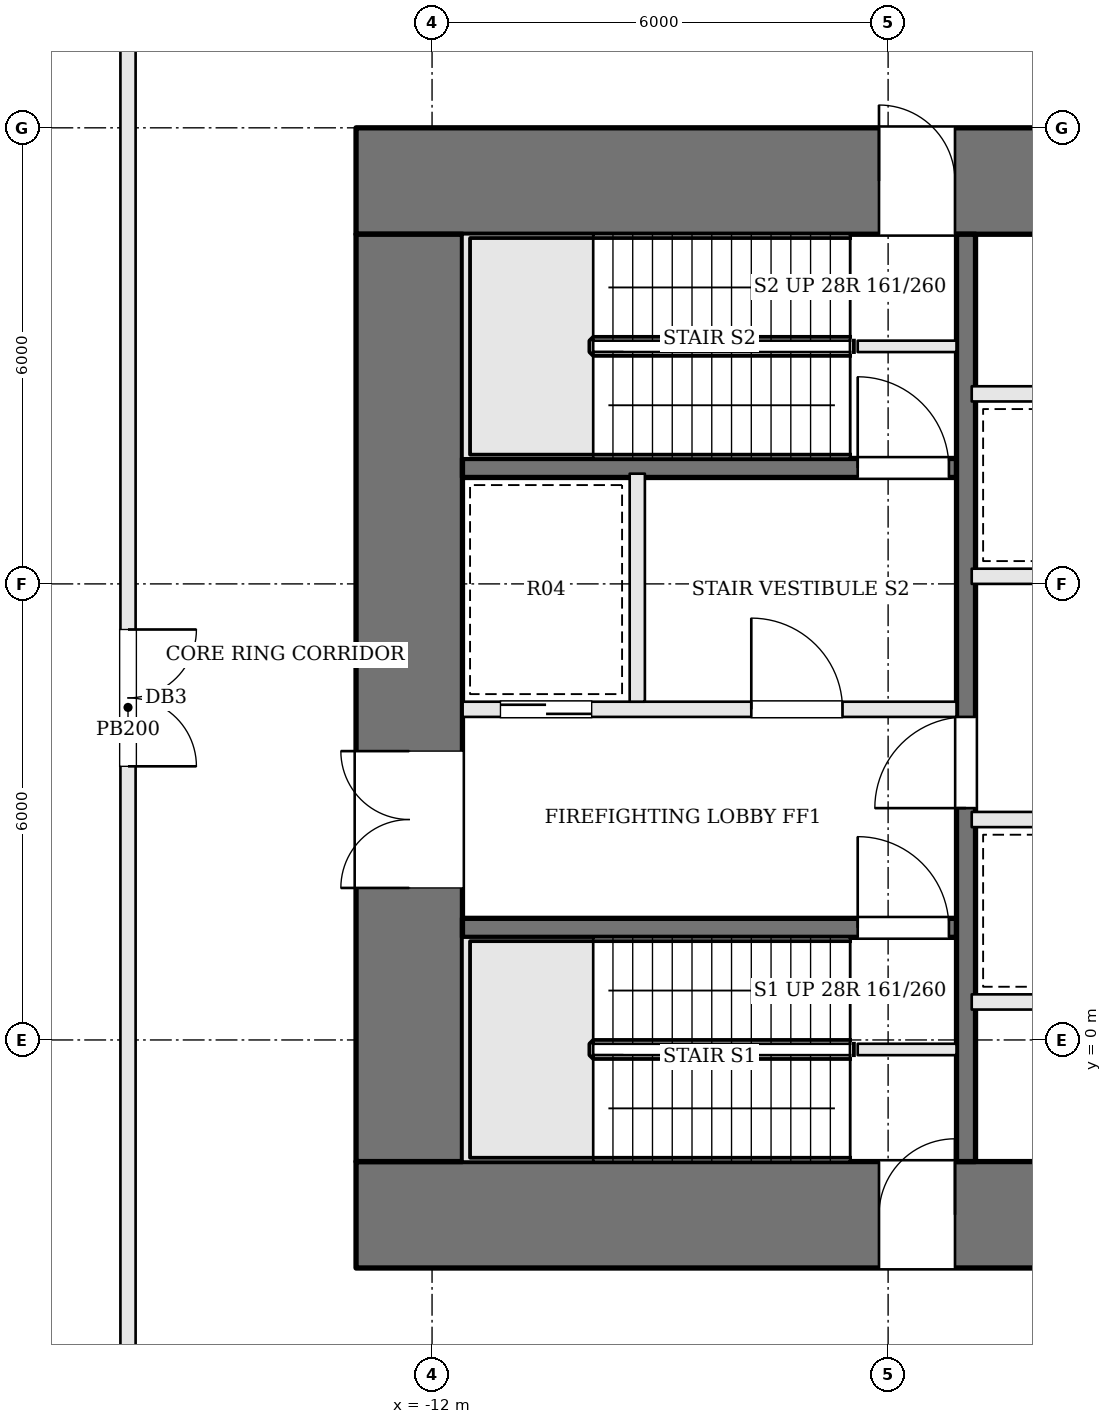
"""IFC4 building model, lengths in metres.
Left out: names, types, materials, properties, quantities, classifications, styles, units other than length and angle.
Written with IfcOpenShell. Run it as: python <this file> out.ifc"""

import sys

from ifc_helpers import new_model, si_unit, direction, frame, frame_2d, origin, place, context, subcontext, project, spatial, rectangle, extrude, element, fill, save


model = new_model("IFC4")
c1 = context("Model", 3, precision=1e-05, world=origin(), true_north=direction((0.0, 1.0)))
c2 = subcontext(c1, "Body", "Model", "MODEL_VIEW")
j1 = project(units=[si_unit("LENGTHUNIT", "METRE"), si_unit("PLANEANGLEUNIT", "RADIAN")], contexts=[c1])
p1 = place(None, origin())
s1 = spatial("IfcSite", under=j1, at=p1, CompositionType="ELEMENT")
p2 = place(p1, origin())
s2 = spatial("IfcBuilding", under=s1, at=p2, CompositionType="ELEMENT")
p3 = place(p2, frame((0.0, 0.0, 33.0)))
s3 = spatial("IfcBuildingStorey", under=s2, at=p3, CompositionType="ELEMENT", Elevation=33.0)
p4 = place(p3, frame((-13.0, 11.3, 0.0), z_axis=(0.0, 0.0, 1.0), x_axis=(1.0, 0.0, 0.0)))
e1 = element("IfcWall", 1, at=p4, inside=s3, PredefinedType="SHEAR", context=c2, shape_type="SweptSolid", body=[
    extrude(rectangle(XDim=26.0, YDim=1.4, at=frame_2d((13.0, 0.0))), origin(), (0.0, 0.0, 1.0), 4.5),
])
p5 = place(p4, frame((8.975, 0.0, 0.0)))
e2 = element("IfcOpeningElement", 2, at=p5, cuts=e1, PredefinedType="OPENING", context=c2, shape_type="SweptSolid", body=[
    extrude(rectangle(XDim=0.7, YDim=2.1, at=frame_2d((0.35, 1.05))), frame((0.0, 0.71, 0.0), z_axis=(0.0, -1.0, 0.0), x_axis=(1.0, 0.0, 0.0)), (0.0, 0.0, 1.0), 1.42),
])
p6 = place(p4, frame((11.575, 0.0, 0.0)))
e3 = element("IfcOpeningElement", 3, at=p6, cuts=e1, PredefinedType="OPENING", context=c2, shape_type="SweptSolid", body=[
    extrude(rectangle(XDim=1.2, YDim=2.1, at=frame_2d((0.6, 1.05))), frame((0.0, 0.71, 0.0), z_axis=(0.0, -1.0, 0.0), x_axis=(1.0, 0.0, 0.0)), (0.0, 0.0, 1.0), 1.42),
])
p7 = place(p4, frame((14.675, 0.0, 0.0)))
e4 = element("IfcOpeningElement", 4, at=p7, cuts=e1, PredefinedType="OPENING", context=c2, shape_type="SweptSolid", body=[
    extrude(rectangle(XDim=0.7, YDim=2.1, at=frame_2d((0.35, 1.05))), frame((0.0, 0.71, 0.0), z_axis=(0.0, -1.0, 0.0), x_axis=(1.0, 0.0, 0.0)), (0.0, 0.0, 1.0), 1.42),
])
p8 = place(p4, frame((16.725, 0.0, 0.0)))
e5 = element("IfcOpeningElement", 5, at=p8, cuts=e1, PredefinedType="OPENING", context=c2, shape_type="SweptSolid", body=[
    extrude(rectangle(XDim=0.7, YDim=2.1, at=frame_2d((0.35, 1.05))), frame((0.0, 0.71, 0.0), z_axis=(0.0, -1.0, 0.0), x_axis=(1.0, 0.0, 0.0)), (0.0, 0.0, 1.0), 1.42),
])
p9 = place(p4, frame((6.88, 0.0, 0.0)))
e6 = element("IfcOpeningElement", 6, at=p9, cuts=e1, PredefinedType="OPENING", context=c2, shape_type="SweptSolid", body=[
    extrude(rectangle(XDim=1.0, YDim=2.1, at=frame_2d((0.5, 1.05))), frame((0.0, 0.71, 0.0), z_axis=(0.0, -1.0, 0.0), x_axis=(1.0, 0.0, 0.0)), (0.0, 0.0, 1.0), 1.42),
])
p10 = place(p4, frame((18.12, 0.0, 0.0)))
e7 = element("IfcOpeningElement", 7, at=p10, cuts=e1, PredefinedType="OPENING", context=c2, shape_type="SweptSolid", body=[
    extrude(rectangle(XDim=1.0, YDim=2.1, at=frame_2d((0.5, 1.05))), frame((0.0, 0.71, 0.0), z_axis=(0.0, -1.0, 0.0), x_axis=(1.0, 0.0, 0.0)), (0.0, 0.0, 1.0), 1.42),
])
p11 = place(p3, frame((-13.0, -2.3, 0.0), z_axis=(0.0, 0.0, 1.0), x_axis=(1.0, 0.0, 0.0)))
e8 = element("IfcWall", 8, at=p11, inside=s3, PredefinedType="SHEAR", context=c2, shape_type="SweptSolid", body=[
    extrude(rectangle(XDim=26.0, YDim=1.4, at=frame_2d((13.0, 0.0))), origin(), (0.0, 0.0, 1.0), 4.5),
])
p12 = place(p11, frame((9.125, 0.0, 0.0)))
e9 = element("IfcOpeningElement", 9, at=p12, cuts=e8, PredefinedType="OPENING", context=c2, shape_type="SweptSolid", body=[
    extrude(rectangle(XDim=1.2, YDim=2.1, at=frame_2d((0.6, 1.05))), frame((0.0, 0.71, 0.0), z_axis=(0.0, -1.0, 0.0), x_axis=(1.0, 0.0, 0.0)), (0.0, 0.0, 1.0), 1.42),
])
p13 = place(p11, frame((12.375, 0.0, 0.0)))
e10 = element("IfcOpeningElement", 10, at=p13, cuts=e8, PredefinedType="OPENING", context=c2, shape_type="SweptSolid", body=[
    extrude(rectangle(XDim=1.2, YDim=2.1, at=frame_2d((0.6, 1.05))), frame((0.0, 0.71, 0.0), z_axis=(0.0, -1.0, 0.0), x_axis=(1.0, 0.0, 0.0)), (0.0, 0.0, 1.0), 1.42),
])
p14 = place(p11, frame((15.65, 0.0, 0.0)))
e11 = element("IfcOpeningElement", 11, at=p14, cuts=e8, PredefinedType="OPENING", context=c2, shape_type="SweptSolid", body=[
    extrude(rectangle(XDim=1.2, YDim=2.1, at=frame_2d((0.6, 1.05))), frame((0.0, 0.71, 0.0), z_axis=(0.0, -1.0, 0.0), x_axis=(1.0, 0.0, 0.0)), (0.0, 0.0, 1.0), 1.42),
])
p15 = place(p11, frame((6.88, 0.0, 0.0)))
e12 = element("IfcOpeningElement", 12, at=p15, cuts=e8, PredefinedType="OPENING", context=c2, shape_type="SweptSolid", body=[
    extrude(rectangle(XDim=1.0, YDim=2.1, at=frame_2d((0.5, 1.05))), frame((0.0, 0.71, 0.0), z_axis=(0.0, -1.0, 0.0), x_axis=(1.0, 0.0, 0.0)), (0.0, 0.0, 1.0), 1.42),
])
p16 = place(p11, frame((18.12, 0.0, 0.0)))
e13 = element("IfcOpeningElement", 13, at=p16, cuts=e8, PredefinedType="OPENING", context=c2, shape_type="SweptSolid", body=[
    extrude(rectangle(XDim=1.0, YDim=2.1, at=frame_2d((0.5, 1.05))), frame((0.0, 0.71, 0.0), z_axis=(0.0, -1.0, 0.0), x_axis=(1.0, 0.0, 0.0)), (0.0, 0.0, 1.0), 1.42),
])
p17 = place(p3, frame((-12.3, -1.6, 0.0), z_axis=(0.0, 0.0, 1.0), x_axis=(0.0, 1.0, 0.0)))
e14 = element("IfcWall", 14, at=p17, inside=s3, PredefinedType="SHEAR", context=c2, shape_type="SweptSolid", body=[
    extrude(rectangle(XDim=12.2, YDim=1.4, at=frame_2d((6.1, 0.0))), origin(), (0.0, 0.0, 1.0), 4.5),
])
p18 = place(p17, frame((3.6, 0.0, 0.0)))
e15 = element("IfcOpeningElement", 15, at=p18, cuts=e14, PredefinedType="OPENING", context=c2, shape_type="SweptSolid", body=[
    extrude(rectangle(XDim=1.8, YDim=2.1, at=frame_2d((0.9, 1.05))), frame((0.0, 0.71, 0.0), z_axis=(0.0, -1.0, 0.0), x_axis=(1.0, 0.0, 0.0)), (0.0, 0.0, 1.0), 1.42),
])
for number, where, z_axis, x_axis in (
    (16, (-6.4, -0.125, 0.0), (0.0, 0.0, 1.0), (1.0, 0.0, 0.0)),
    (17, (-6.4, 9.125, 0.0), (0.0, 0.0, 1.0), (1.0, 0.0, 0.0)),
):
    element("IfcWall", number, at=place(p3, frame(where, z_axis=z_axis, x_axis=x_axis)), inside=s3, PredefinedType="SOLIDWALL", context=c2, shape_type="SweptSolid", body=[
        extrude(rectangle(XDim=1.3, YDim=0.15, at=frame_2d((0.65, 0.0))), origin(), (0.0, 0.0, 1.0), 4.3),
    ])
p19 = place(p3, frame((-11.6, 1.475, 0.0), z_axis=(0.0, 0.0, 1.0), x_axis=(1.0, 0.0, 0.0)))
e18 = element("IfcWall", 18, at=p19, inside=s3, PredefinedType="SOLIDWALL", context=c2, shape_type="SweptSolid", body=[
    extrude(rectangle(XDim=6.5, YDim=0.25, at=frame_2d((3.25, 0.0))), origin(), (0.0, 0.0, 1.0), 4.3),
])
p20 = place(p19, frame((5.2, 0.0, 0.0)))
e19 = element("IfcOpeningElement", 19, at=p20, cuts=e18, PredefinedType="OPENING", context=c2, shape_type="SweptSolid", body=[
    extrude(rectangle(XDim=1.2, YDim=2.1, at=frame_2d((0.6, 1.05))), frame((0.0, 0.135, 0.0), z_axis=(0.0, -1.0, 0.0), x_axis=(1.0, 0.0, 0.0)), (0.0, 0.0, 1.0), 0.27),
])
p21 = place(p3, frame((-11.6, 4.35, 0.0), z_axis=(0.0, 0.0, 1.0), x_axis=(1.0, 0.0, 0.0)))
e20 = element("IfcWall", 20, at=p21, inside=s3, PredefinedType="SOLIDWALL", context=c2, shape_type="SweptSolid", body=[
    extrude(rectangle(XDim=6.5, YDim=0.2, at=frame_2d((3.25, 0.0))), origin(), (0.0, 0.0, 1.0), 4.3),
])
p22 = place(p21, frame((3.8, 0.0, 0.0)))
e21 = element("IfcOpeningElement", 21, at=p22, cuts=e20, PredefinedType="OPENING", context=c2, shape_type="SweptSolid", body=[
    extrude(rectangle(XDim=1.2, YDim=2.1, at=frame_2d((0.6, 1.05))), frame((0.0, 0.11, 0.0), z_axis=(0.0, -1.0, 0.0), x_axis=(1.0, 0.0, 0.0)), (0.0, 0.0, 1.0), 0.22),
])
p23 = place(p21, frame((0.5, 0.0, 0.0)))
e22 = element("IfcOpeningElement", 22, at=p23, cuts=e20, PredefinedType="OPENING", context=c2, shape_type="SweptSolid", body=[
    extrude(rectangle(XDim=1.2, YDim=2.1, at=frame_2d((0.6, 1.05))), frame((0.0, 0.11, 0.0), z_axis=(0.0, -1.0, 0.0), x_axis=(1.0, 0.0, 0.0)), (0.0, 0.0, 1.0), 0.22),
])
p24 = place(p3, frame((-11.6, 7.525, 0.0), z_axis=(0.0, 0.0, 1.0), x_axis=(1.0, 0.0, 0.0)))
e23 = element("IfcWall", 23, at=p24, inside=s3, PredefinedType="SOLIDWALL", context=c2, shape_type="SweptSolid", body=[
    extrude(rectangle(XDim=6.5, YDim=0.25, at=frame_2d((3.25, 0.0))), origin(), (0.0, 0.0, 1.0), 4.3),
])
p25 = place(p24, frame((5.2, 0.0, 0.0)))
e24 = element("IfcOpeningElement", 24, at=p25, cuts=e23, PredefinedType="OPENING", context=c2, shape_type="SweptSolid", body=[
    extrude(rectangle(XDim=1.2, YDim=2.1, at=frame_2d((0.6, 1.05))), frame((0.0, 0.135, 0.0), z_axis=(0.0, -1.0, 0.0), x_axis=(1.0, 0.0, 0.0)), (0.0, 0.0, 1.0), 0.27),
])
p26 = place(p3, frame((-9.3, 4.45, 0.0), z_axis=(0.0, 0.0, 1.0), x_axis=(0.0, 1.0, 0.0)))
e25 = element("IfcWall", 25, at=p26, inside=s3, PredefinedType="SOLIDWALL", context=c2, shape_type="SweptSolid", body=[
    extrude(rectangle(XDim=3.0, YDim=0.2, at=frame_2d((1.5, 0.0))), origin(), (0.0, 0.0, 1.0), 4.3),
])
p27 = place(p3, frame((-4.975, -1.6, 0.0), z_axis=(0.0, 0.0, 1.0), x_axis=(0.0, 1.0, 0.0)))
e26 = element("IfcWall", 26, at=p27, inside=s3, PredefinedType="SOLIDWALL", context=c2, shape_type="SweptSolid", body=[
    extrude(rectangle(XDim=12.2, YDim=0.25, at=frame_2d((6.1, 0.0))), origin(), (0.0, 0.0, 1.0), 4.3),
])
p28 = place(p27, frame((4.65, 0.0, 0.0)))
e27 = element("IfcOpeningElement", 27, at=p28, cuts=e26, PredefinedType="OPENING", context=c2, shape_type="SweptSolid", body=[
    extrude(rectangle(XDim=1.2, YDim=2.1, at=frame_2d((0.6, 1.05))), frame((0.0, 0.135, 0.0), z_axis=(0.0, -1.0, 0.0), x_axis=(1.0, 0.0, 0.0)), (0.0, 0.0, 1.0), 0.27),
])
for number, where, z_axis, x_axis in (
    (28, (-4.9, 0.5, 0.0), (0.0, 0.0, 1.0), (1.0, 0.0, 0.0)),
    (29, (-4.9, 2.9, 0.0), (0.0, 0.0, 1.0), (1.0, 0.0, 0.0)),
    (30, (-4.9, 6.1, 0.0), (0.0, 0.0, 1.0), (1.0, 0.0, 0.0)),
    (31, (-4.9, 8.5, 0.0), (0.0, 0.0, 1.0), (1.0, 0.0, 0.0)),
):
    element("IfcWall", number, at=place(p3, frame(where, z_axis=z_axis, x_axis=x_axis)), inside=s3, PredefinedType="SOLIDWALL", context=c2, shape_type="SweptSolid", body=[
        extrude(rectangle(XDim=9.8, YDim=0.2, at=frame_2d((4.9, 0.0))), origin(), (0.0, 0.0, 1.0), 4.3),
    ])
p29 = place(p3, frame((-19.962, 12.664, 0.0), z_axis=(0.0, 0.0, 1.0), x_axis=(0.847051762776, 0.531510405522, 0.0)))
e32 = element("IfcWall", 32, at=p29, inside=s3, PredefinedType="SOLIDWALL", context=c2, shape_type="SweptSolid", body=[
    extrude(rectangle(XDim=5.863, YDim=0.3, at=frame_2d((2.931, 0.0))), origin(), (0.0, 0.0, 1.0), 4.3),
])
p30 = place(p3, frame((-16.0, 14.85, 0.0), z_axis=(0.0, 0.0, 1.0), x_axis=(0.0, -1.0, 0.0)))
e33 = element("IfcWall", 33, at=p30, inside=s3, PredefinedType="PARTITIONING", context=c2, shape_type="SweptSolid", body=[
    extrude(rectangle(XDim=20.95, YDim=0.2, at=frame_2d((10.475, 0.0))), origin(), (0.0, 0.0, 1.0), 4.3),
])
p31 = place(p30, frame((9.45, 0.0, 0.0)))
e34 = element("IfcOpeningElement", 34, at=p31, cuts=e33, PredefinedType="OPENING", context=c2, shape_type="SweptSolid", body=[
    extrude(rectangle(XDim=1.8, YDim=2.1, at=frame_2d((0.9, 1.05))), frame((0.0, 0.11, 0.0), z_axis=(0.0, -1.0, 0.0), x_axis=(1.0, 0.0, 0.0)), (0.0, 0.0, 1.0), 0.22),
])
p32 = place(p18, origin())
e35 = element("IfcDoor", 35, at=p32, inside=s3, OperationType="DOUBLE_DOOR_SINGLE_SWING", PredefinedType="DOOR", context=c2, shape_type="SweptSolid", body=[
    extrude(rectangle(XDim=1.8, YDim=2.1, at=frame_2d((0.9, 1.05))), frame((0.0, 0.025, 0.0), z_axis=(0.0, -1.0, 0.0), x_axis=(1.0, 0.0, 0.0)), (0.0, 0.0, 1.0), 0.05),
])
fill(e15, e35)
p33 = place(p28, origin())
e36 = element("IfcDoor", 36, at=p33, inside=s3, OperationType="SINGLE_SWING_LEFT", PredefinedType="DOOR", context=c2, shape_type="SweptSolid", body=[
    extrude(rectangle(XDim=1.2, YDim=2.1, at=frame_2d((0.6, 1.05))), frame((0.0, 0.025, 0.0), z_axis=(0.0, -1.0, 0.0), x_axis=(1.0, 0.0, 0.0)), (0.0, 0.0, 1.0), 0.05),
])
fill(e27, e36)
p34 = place(p22, origin())
e37 = element("IfcDoor", 37, at=p34, inside=s3, OperationType="SINGLE_SWING_LEFT", PredefinedType="DOOR", context=c2, shape_type="SweptSolid", body=[
    extrude(rectangle(XDim=1.2, YDim=2.1, at=frame_2d((0.6, 1.05))), frame((0.0, 0.025, 0.0), z_axis=(0.0, -1.0, 0.0), x_axis=(1.0, 0.0, 0.0)), (0.0, 0.0, 1.0), 0.05),
])
fill(e21, e37)
p35 = place(p20, origin())
e38 = element("IfcDoor", 38, at=p35, inside=s3, OperationType="SINGLE_SWING_LEFT", PredefinedType="DOOR", context=c2, shape_type="SweptSolid", body=[
    extrude(rectangle(XDim=1.2, YDim=2.1, at=frame_2d((0.6, 1.05))), frame((0.0, 0.025, 0.0), z_axis=(0.0, -1.0, 0.0), x_axis=(1.0, 0.0, 0.0)), (0.0, 0.0, 1.0), 0.05),
])
fill(e19, e38)
p36 = place(p25, origin())
e39 = element("IfcDoor", 39, at=p36, inside=s3, OperationType="SINGLE_SWING_LEFT", PredefinedType="DOOR", context=c2, shape_type="SweptSolid", body=[
    extrude(rectangle(XDim=1.2, YDim=2.1, at=frame_2d((0.6, 1.05))), frame((0.0, 0.025, 0.0), z_axis=(0.0, -1.0, 0.0), x_axis=(1.0, 0.0, 0.0)), (0.0, 0.0, 1.0), 0.05),
])
fill(e24, e39)
p37 = place(p23, origin())
e40 = element("IfcDoor", 40, at=p37, inside=s3, OperationType="SLIDING_TO_RIGHT", PredefinedType="DOOR", context=c2, shape_type="SweptSolid", body=[
    extrude(rectangle(XDim=1.2, YDim=2.1, at=frame_2d((0.6, 1.05))), frame((0.0, 0.025, 0.0), z_axis=(0.0, -1.0, 0.0), x_axis=(1.0, 0.0, 0.0)), (0.0, 0.0, 1.0), 0.05),
])
fill(e22, e40)
p38 = place(p15, origin())
e41 = element("IfcDoor", 41, at=p38, inside=s3, OperationType="SINGLE_SWING_RIGHT", PredefinedType="DOOR", context=c2, shape_type="SweptSolid", body=[
    extrude(rectangle(XDim=1.0, YDim=2.1, at=frame_2d((0.5, 1.05))), frame((0.0, 0.025, 0.0), z_axis=(0.0, -1.0, 0.0), x_axis=(1.0, 0.0, 0.0)), (0.0, 0.0, 1.0), 0.05),
])
fill(e12, e41)
p39 = place(p9, origin())
e42 = element("IfcDoor", 42, at=p39, inside=s3, OperationType="SINGLE_SWING_LEFT", PredefinedType="DOOR", context=c2, shape_type="SweptSolid", body=[
    extrude(rectangle(XDim=1.0, YDim=2.1, at=frame_2d((0.5, 1.05))), frame((0.0, 0.025, 0.0), z_axis=(0.0, -1.0, 0.0), x_axis=(1.0, 0.0, 0.0)), (0.0, 0.0, 1.0), 0.05),
])
fill(e6, e42)
p40 = place(p31, origin())
e43 = element("IfcDoor", 43, at=p40, inside=s3, OperationType="DOUBLE_DOOR_SINGLE_SWING", PredefinedType="DOOR", context=c2, shape_type="SweptSolid", body=[
    extrude(rectangle(XDim=1.8, YDim=2.1, at=frame_2d((0.9, 1.05))), frame((0.0, 0.025, 0.0), z_axis=(0.0, -1.0, 0.0), x_axis=(1.0, 0.0, 0.0)), (0.0, 0.0, 1.0), 0.05),
])
fill(e34, e43)
save(model, sys.argv[1])
